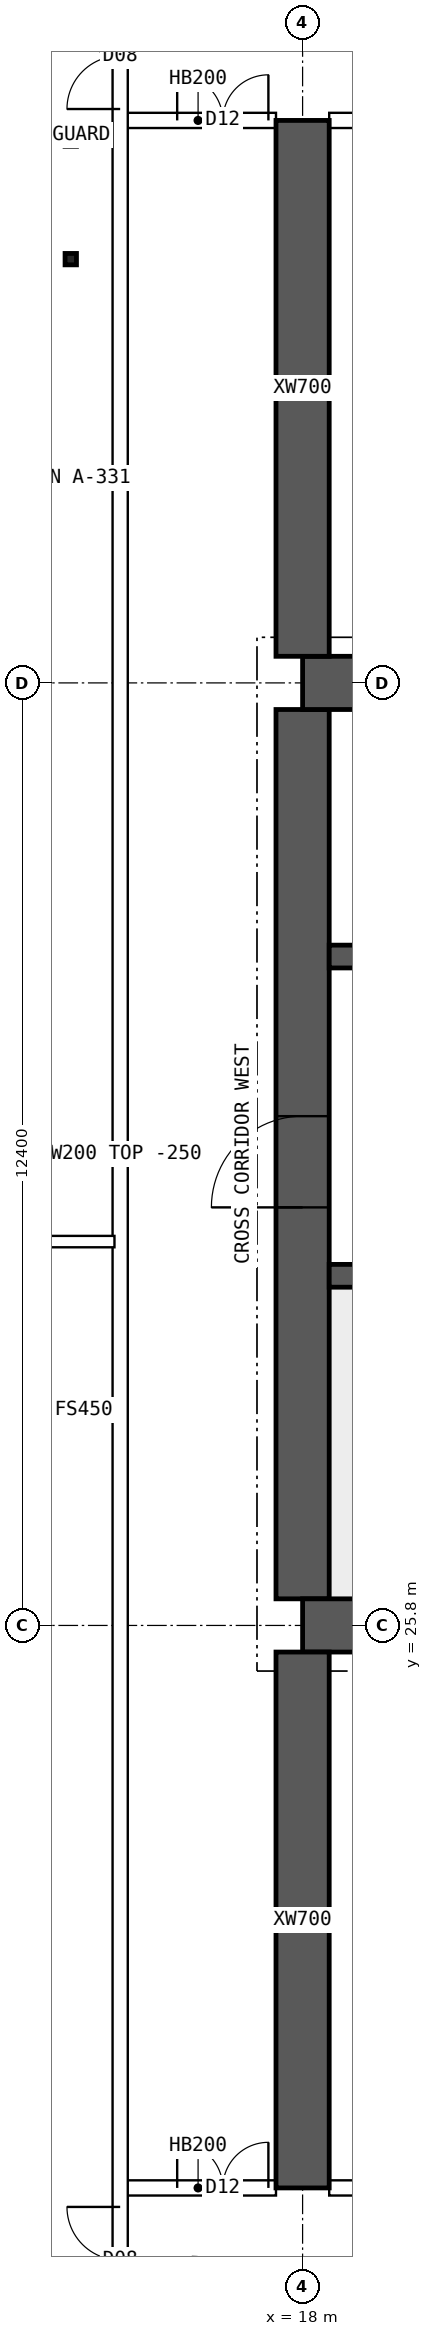
"""IFC4 building model, lengths in metres.
Left out: names, types, materials, properties, quantities, classifications, styles, units other than length and angle.
Written with IfcOpenShell. Run it as: python <this file> out.ifc"""

import sys

from ifc_helpers import new_model, si_unit, direction, frame, frame_2d, origin, origin_2d, place, context, subcontext, project, spatial, polyline, rectangle, hollow_rectangle, outline, extrude, element, fill, save


model = new_model("IFC4")
c1 = context("Model", 3, precision=1e-05, world=origin(), true_north=direction((0.0, 1.0)))
c2 = subcontext(c1, "Body", "Model", "MODEL_VIEW")
j1 = project(units=[si_unit("LENGTHUNIT", "METRE"), si_unit("PLANEANGLEUNIT", "RADIAN")], contexts=[c1])
p1 = place(None, origin())
s1 = spatial("IfcSite", under=j1, at=p1, CompositionType="ELEMENT")
p2 = place(p1, origin())
s2 = spatial("IfcBuilding", under=s1, at=p2, CompositionType="ELEMENT")
p3 = place(p2, frame((0.0, 0.0, 246.55)))
s3 = spatial("IfcBuildingStorey", under=s2, at=p3, CompositionType="ELEMENT", Elevation=246.55)
for number, where, z_axis, x_axis in (
    (1, (18.0, 25.8, 0.0), (0.0, 0.0, 1.0), (1.0, 0.0, 0.0)),
    (2, (18.0, 38.2, 0.0), (0.0, 0.0, 1.0), (1.0, 0.0, 0.0)),
):
    element("IfcWall", number, at=place(p3, frame(where, z_axis=z_axis, x_axis=x_axis)), inside=s3, PredefinedType="SHEAR", context=c2, shape_type="SweptSolid", body=[
        extrude(rectangle(XDim=48.0, YDim=0.7, at=frame_2d((24.0, 0.0))), origin(), (0.0, 0.0, 1.0), 3.75),
    ])
p4 = place(p3, frame((18.0, 26.15, 0.0), z_axis=(0.0, 0.0, 1.0), x_axis=(0.0, 1.0, 0.0)))
e3 = element("IfcWall", 3, at=p4, inside=s3, PredefinedType="SHEAR", context=c2, shape_type="SweptSolid", body=[
    extrude(rectangle(XDim=11.7, YDim=0.7, at=frame_2d((5.85, 0.0))), origin(), (0.0, 0.0, 1.0), 3.75),
])
p5 = place(p4, frame((5.15, 0.0, 0.0)))
e4 = element("IfcOpeningElement", 4, at=p5, cuts=e3, PredefinedType="OPENING", context=c2, shape_type="SweptSolid", body=[
    extrude(rectangle(XDim=1.2, YDim=2.1, at=frame_2d((0.6, 1.05))), frame((0.0, 0.36, 0.0), z_axis=(0.0, -1.0, 0.0), x_axis=(1.0, 0.0, 0.0)), (0.0, 0.0, 1.0), 0.72),
])
p6 = place(p3, frame((18.35, 30.4, 0.0), z_axis=(0.0, 0.0, 1.0), x_axis=(1.0, 0.0, 0.0)))
e5 = element("IfcWall", 5, at=p6, inside=s3, PredefinedType="SHEAR", context=c2, shape_type="SweptSolid", body=[
    extrude(rectangle(XDim=47.3, YDim=0.3, at=frame_2d((23.65, 0.0))), origin(), (0.0, 0.0, 1.0), 3.75),
])
p7 = place(p6, frame((0.4, 0.0, 0.0)))
e6 = element("IfcOpeningElement", 6, at=p7, cuts=e5, PredefinedType="OPENING", context=c2, shape_type="SweptSolid", body=[
    extrude(rectangle(XDim=1.0, YDim=2.1, at=frame_2d((0.5, 1.05))), frame((0.0, 0.16, 0.0), z_axis=(0.0, -1.0, 0.0), x_axis=(1.0, 0.0, 0.0)), (0.0, 0.0, 1.0), 0.32),
])
p8 = place(p6, frame((45.9, 0.0, 0.0)))
e7 = element("IfcOpeningElement", 7, at=p8, cuts=e5, PredefinedType="OPENING", context=c2, shape_type="SweptSolid", body=[
    extrude(rectangle(XDim=1.0, YDim=2.1, at=frame_2d((0.5, 1.05))), frame((0.0, 0.16, 0.0), z_axis=(0.0, -1.0, 0.0), x_axis=(1.0, 0.0, 0.0)), (0.0, 0.0, 1.0), 0.32),
])
p9 = place(p6, frame((8.4, 0.0, 0.0)))
e8 = element("IfcOpeningElement", 8, at=p9, cuts=e5, PredefinedType="OPENING", context=c2, shape_type="SweptSolid", body=[
    extrude(rectangle(XDim=1.1, YDim=2.1, at=frame_2d((0.55, 1.05))), frame((0.0, 0.16, 0.0), z_axis=(0.0, -1.0, 0.0), x_axis=(1.0, 0.0, 0.0)), (0.0, 0.0, 1.0), 0.32),
])
p10 = place(p6, frame((11.0, 0.0, 0.0)))
e9 = element("IfcOpeningElement", 9, at=p10, cuts=e5, PredefinedType="OPENING", context=c2, shape_type="SweptSolid", body=[
    extrude(rectangle(XDim=1.1, YDim=2.1, at=frame_2d((0.55, 1.05))), frame((0.0, 0.16, 0.0), z_axis=(0.0, -1.0, 0.0), x_axis=(1.0, 0.0, 0.0)), (0.0, 0.0, 1.0), 0.32),
])
p11 = place(p6, frame((13.6, 0.0, 0.0)))
e10 = element("IfcOpeningElement", 10, at=p11, cuts=e5, PredefinedType="OPENING", context=c2, shape_type="SweptSolid", body=[
    extrude(rectangle(XDim=1.1, YDim=2.1, at=frame_2d((0.55, 1.05))), frame((0.0, 0.16, 0.0), z_axis=(0.0, -1.0, 0.0), x_axis=(1.0, 0.0, 0.0)), (0.0, 0.0, 1.0), 0.32),
])
p12 = place(p6, frame((16.2, 0.0, 0.0)))
e11 = element("IfcOpeningElement", 11, at=p12, cuts=e5, PredefinedType="OPENING", context=c2, shape_type="SweptSolid", body=[
    extrude(rectangle(XDim=1.1, YDim=2.1, at=frame_2d((0.55, 1.05))), frame((0.0, 0.16, 0.0), z_axis=(0.0, -1.0, 0.0), x_axis=(1.0, 0.0, 0.0)), (0.0, 0.0, 1.0), 0.32),
])
p13 = place(p6, frame((18.975, 0.0, 0.0)))
e12 = element("IfcOpeningElement", 12, at=p13, cuts=e5, PredefinedType="OPENING", context=c2, shape_type="SweptSolid", body=[
    extrude(rectangle(XDim=0.9, YDim=2.1, at=frame_2d((0.45, 1.05))), frame((0.0, 0.16, 0.0), z_axis=(0.0, -1.0, 0.0), x_axis=(1.0, 0.0, 0.0)), (0.0, 0.0, 1.0), 0.32),
])
p14 = place(p6, frame((24.475, 0.0, 0.0)))
e13 = element("IfcOpeningElement", 13, at=p14, cuts=e5, PredefinedType="OPENING", context=c2, shape_type="SweptSolid", body=[
    extrude(rectangle(XDim=0.9, YDim=2.1, at=frame_2d((0.45, 1.05))), frame((0.0, 0.16, 0.0), z_axis=(0.0, -1.0, 0.0), x_axis=(1.0, 0.0, 0.0)), (0.0, 0.0, 1.0), 0.32),
])
p15 = place(p6, frame((30.267, 0.0, 0.0)))
e14 = element("IfcOpeningElement", 14, at=p15, cuts=e5, PredefinedType="OPENING", context=c2, shape_type="SweptSolid", body=[
    extrude(rectangle(XDim=1.1, YDim=2.1, at=frame_2d((0.55, 1.05))), frame((0.0, 0.16, 0.0), z_axis=(0.0, -1.0, 0.0), x_axis=(1.0, 0.0, 0.0)), (0.0, 0.0, 1.0), 0.32),
])
p16 = place(p6, frame((33.8, 0.0, 0.0)))
e15 = element("IfcOpeningElement", 15, at=p16, cuts=e5, PredefinedType="OPENING", context=c2, shape_type="SweptSolid", body=[
    extrude(rectangle(XDim=1.1, YDim=2.1, at=frame_2d((0.55, 1.05))), frame((0.0, 0.16, 0.0), z_axis=(0.0, -1.0, 0.0), x_axis=(1.0, 0.0, 0.0)), (0.0, 0.0, 1.0), 0.32),
])
p17 = place(p6, frame((37.333, 0.0, 0.0)))
e16 = element("IfcOpeningElement", 16, at=p17, cuts=e5, PredefinedType="OPENING", context=c2, shape_type="SweptSolid", body=[
    extrude(rectangle(XDim=1.1, YDim=2.1, at=frame_2d((0.55, 1.05))), frame((0.0, 0.16, 0.0), z_axis=(0.0, -1.0, 0.0), x_axis=(1.0, 0.0, 0.0)), (0.0, 0.0, 1.0), 0.32),
])
p18 = place(p3, frame((18.35, 34.6, 0.0), z_axis=(0.0, 0.0, 1.0), x_axis=(1.0, 0.0, 0.0)))
e17 = element("IfcWall", 17, at=p18, inside=s3, PredefinedType="SHEAR", context=c2, shape_type="SweptSolid", body=[
    extrude(rectangle(XDim=47.3, YDim=0.3, at=frame_2d((23.65, 0.0))), origin(), (0.0, 0.0, 1.0), 3.75),
])
p19 = place(p18, frame((0.9, 0.0, 0.0)))
e18 = element("IfcOpeningElement", 18, at=p19, cuts=e17, PredefinedType="OPENING", context=c2, shape_type="SweptSolid", body=[
    extrude(rectangle(XDim=1.1, YDim=2.1, at=frame_2d((0.55, 1.05))), frame((0.0, 0.16, 0.0), z_axis=(0.0, -1.0, 0.0), x_axis=(1.0, 0.0, 0.0)), (0.0, 0.0, 1.0), 0.32),
])
p20 = place(p18, frame((45.3, 0.0, 0.0)))
e19 = element("IfcOpeningElement", 19, at=p20, cuts=e17, PredefinedType="OPENING", context=c2, shape_type="SweptSolid", body=[
    extrude(rectangle(XDim=1.1, YDim=2.1, at=frame_2d((0.55, 1.05))), frame((0.0, 0.16, 0.0), z_axis=(0.0, -1.0, 0.0), x_axis=(1.0, 0.0, 0.0)), (0.0, 0.0, 1.0), 0.32),
])
p21 = place(p18, frame((4.25, 0.0, 0.0)))
e20 = element("IfcOpeningElement", 20, at=p21, cuts=e17, PredefinedType="OPENING", context=c2, shape_type="SweptSolid", body=[
    extrude(rectangle(XDim=0.9, YDim=2.1, at=frame_2d((0.45, 1.05))), frame((0.0, 0.16, 0.0), z_axis=(0.0, -1.0, 0.0), x_axis=(1.0, 0.0, 0.0)), (0.0, 0.0, 1.0), 0.32),
])
p22 = place(p18, frame((42.15, 0.0, 0.0)))
e21 = element("IfcOpeningElement", 21, at=p22, cuts=e17, PredefinedType="OPENING", context=c2, shape_type="SweptSolid", body=[
    extrude(rectangle(XDim=0.9, YDim=2.1, at=frame_2d((0.45, 1.05))), frame((0.0, 0.16, 0.0), z_axis=(0.0, -1.0, 0.0), x_axis=(1.0, 0.0, 0.0)), (0.0, 0.0, 1.0), 0.32),
])
p23 = place(p18, frame((9.025, 0.0, 0.0)))
e22 = element("IfcOpeningElement", 22, at=p23, cuts=e17, PredefinedType="OPENING", context=c2, shape_type="SweptSolid", body=[
    extrude(rectangle(XDim=0.9, YDim=2.1, at=frame_2d((0.45, 1.05))), frame((0.0, 0.16, 0.0), z_axis=(0.0, -1.0, 0.0), x_axis=(1.0, 0.0, 0.0)), (0.0, 0.0, 1.0), 0.32),
])
p24 = place(p18, frame((12.999, 0.0, 0.0)))
e23 = element("IfcOpeningElement", 23, at=p24, cuts=e17, PredefinedType="OPENING", context=c2, shape_type="SweptSolid", body=[
    extrude(rectangle(XDim=0.9, YDim=2.1, at=frame_2d((0.45, 1.05))), frame((0.0, 0.16, 0.0), z_axis=(0.0, -1.0, 0.0), x_axis=(1.0, 0.0, 0.0)), (0.0, 0.0, 1.0), 0.32),
])
p25 = place(p18, frame((16.646, 0.0, 0.0)))
e24 = element("IfcOpeningElement", 24, at=p25, cuts=e17, PredefinedType="OPENING", context=c2, shape_type="SweptSolid", body=[
    extrude(rectangle(XDim=0.9, YDim=2.1, at=frame_2d((0.45, 1.05))), frame((0.0, 0.16, 0.0), z_axis=(0.0, -1.0, 0.0), x_axis=(1.0, 0.0, 0.0)), (0.0, 0.0, 1.0), 0.32),
])
p26 = place(p18, frame((20.405, 0.0, 0.0)))
e25 = element("IfcOpeningElement", 25, at=p26, cuts=e17, PredefinedType="OPENING", context=c2, shape_type="SweptSolid", body=[
    extrude(rectangle(XDim=0.9, YDim=2.1, at=frame_2d((0.45, 1.05))), frame((0.0, 0.16, 0.0), z_axis=(0.0, -1.0, 0.0), x_axis=(1.0, 0.0, 0.0)), (0.0, 0.0, 1.0), 0.32),
])
p27 = place(p18, frame((24.811, 0.0, 0.0)))
e26 = element("IfcOpeningElement", 26, at=p27, cuts=e17, PredefinedType="OPENING", context=c2, shape_type="SweptSolid", body=[
    extrude(rectangle(XDim=0.9, YDim=2.1, at=frame_2d((0.45, 1.05))), frame((0.0, 0.16, 0.0), z_axis=(0.0, -1.0, 0.0), x_axis=(1.0, 0.0, 0.0)), (0.0, 0.0, 1.0), 0.32),
])
p28 = place(p18, frame((27.608, 0.0, 0.0)))
e27 = element("IfcOpeningElement", 27, at=p28, cuts=e17, PredefinedType="OPENING", context=c2, shape_type="SweptSolid", body=[
    extrude(rectangle(XDim=0.9, YDim=2.1, at=frame_2d((0.45, 1.05))), frame((0.0, 0.16, 0.0), z_axis=(0.0, -1.0, 0.0), x_axis=(1.0, 0.0, 0.0)), (0.0, 0.0, 1.0), 0.32),
])
p29 = place(p18, frame((29.778, 0.0, 0.0)))
e28 = element("IfcOpeningElement", 28, at=p29, cuts=e17, PredefinedType="OPENING", context=c2, shape_type="SweptSolid", body=[
    extrude(rectangle(XDim=0.9, YDim=2.1, at=frame_2d((0.45, 1.05))), frame((0.0, 0.16, 0.0), z_axis=(0.0, -1.0, 0.0), x_axis=(1.0, 0.0, 0.0)), (0.0, 0.0, 1.0), 0.32),
])
p30 = place(p18, frame((33.577, 0.0, 0.0)))
e29 = element("IfcOpeningElement", 29, at=p30, cuts=e17, PredefinedType="OPENING", context=c2, shape_type="SweptSolid", body=[
    extrude(rectangle(XDim=0.9, YDim=2.1, at=frame_2d((0.45, 1.05))), frame((0.0, 0.16, 0.0), z_axis=(0.0, -1.0, 0.0), x_axis=(1.0, 0.0, 0.0)), (0.0, 0.0, 1.0), 0.32),
])
p31 = place(p18, frame((37.528, 0.0, 0.0)))
e30 = element("IfcOpeningElement", 30, at=p31, cuts=e17, PredefinedType="OPENING", context=c2, shape_type="SweptSolid", body=[
    extrude(rectangle(XDim=0.9, YDim=2.1, at=frame_2d((0.45, 1.05))), frame((0.0, 0.16, 0.0), z_axis=(0.0, -1.0, 0.0), x_axis=(1.0, 0.0, 0.0)), (0.0, 0.0, 1.0), 0.32),
])
for number, where, z_axis, x_axis in (
    (31, (18.0, 18.4, 0.0), (0.0, 0.0, 1.0), (0.0, 1.0, 0.0)),
    (32, (18.0, 38.55, 0.0), (0.0, 0.0, 1.0), (0.0, 1.0, 0.0)),
):
    element("IfcWall", number, at=place(p3, frame(where, z_axis=z_axis, x_axis=x_axis)), inside=s3, PredefinedType="SHEAR", context=c2, shape_type="SweptSolid", body=[
        extrude(rectangle(XDim=7.05, YDim=0.7, at=frame_2d((3.525, 0.0))), origin(), (0.0, 0.0, 1.0), 3.75),
    ])
p32 = place(p3, frame((15.6, 18.4, 0.0), z_axis=(0.0, 0.0, 1.0), x_axis=(1.0, 0.0, 0.0)))
e33 = element("IfcWall", 33, at=p32, inside=s3, PredefinedType="SOLIDWALL", context=c2, shape_type="SweptSolid", body=[
    extrude(rectangle(XDim=2.05, YDim=0.2, at=frame_2d((1.025, 0.0))), origin(), (0.0, 0.0, 1.0), 3.5),
])
p33 = place(p32, frame((0.75, 0.0, 0.0)))
e34 = element("IfcOpeningElement", 34, at=p33, cuts=e33, PredefinedType="OPENING", context=c2, shape_type="SweptSolid", body=[
    extrude(rectangle(XDim=1.2, YDim=2.1, at=frame_2d((0.6, 1.05))), frame((0.0, 0.11, 0.0), z_axis=(0.0, -1.0, 0.0), x_axis=(1.0, 0.0, 0.0)), (0.0, 0.0, 1.0), 0.22),
])
p34 = place(p3, frame((18.35, 18.4, 0.0), z_axis=(0.0, 0.0, 1.0), x_axis=(1.0, 0.0, 0.0)))
e35 = element("IfcWall", 35, at=p34, inside=s3, PredefinedType="SOLIDWALL", context=c2, shape_type="SweptSolid", body=[
    extrude(rectangle(XDim=5.3, YDim=0.2, at=frame_2d((2.65, 0.0))), origin(), (0.0, 0.0, 1.0), 3.5),
])
p35 = place(p34, frame((0.35, 0.0, 0.0)))
e36 = element("IfcOpeningElement", 36, at=p35, cuts=e35, PredefinedType="OPENING", context=c2, shape_type="SweptSolid", body=[
    extrude(rectangle(XDim=0.9, YDim=2.1, at=frame_2d((0.45, 1.05))), frame((0.0, 0.11, 0.0), z_axis=(0.0, -1.0, 0.0), x_axis=(1.0, 0.0, 0.0)), (0.0, 0.0, 1.0), 0.22),
])
p36 = place(p34, frame((3.185, 0.0, 0.0)))
e37 = element("IfcOpeningElement", 37, at=p36, cuts=e35, PredefinedType="OPENING", context=c2, shape_type="SweptSolid", body=[
    extrude(rectangle(XDim=0.9, YDim=2.1, at=frame_2d((0.45, 1.05))), frame((0.0, 0.11, 0.0), z_axis=(0.0, -1.0, 0.0), x_axis=(1.0, 0.0, 0.0)), (0.0, 0.0, 1.0), 0.22),
])
p37 = place(p3, frame((15.6, 45.6, 0.0), z_axis=(0.0, 0.0, 1.0), x_axis=(1.0, 0.0, 0.0)))
e38 = element("IfcWall", 38, at=p37, inside=s3, PredefinedType="SOLIDWALL", context=c2, shape_type="SweptSolid", body=[
    extrude(rectangle(XDim=2.05, YDim=0.2, at=frame_2d((1.025, 0.0))), origin(), (0.0, 0.0, 1.0), 3.5),
])
p38 = place(p37, frame((0.75, 0.0, 0.0)))
e39 = element("IfcOpeningElement", 39, at=p38, cuts=e38, PredefinedType="OPENING", context=c2, shape_type="SweptSolid", body=[
    extrude(rectangle(XDim=1.2, YDim=2.1, at=frame_2d((0.6, 1.05))), frame((0.0, 0.11, 0.0), z_axis=(0.0, -1.0, 0.0), x_axis=(1.0, 0.0, 0.0)), (0.0, 0.0, 1.0), 0.22),
])
p39 = place(p3, frame((18.35, 45.6, 0.0), z_axis=(0.0, 0.0, 1.0), x_axis=(1.0, 0.0, 0.0)))
e40 = element("IfcWall", 40, at=p39, inside=s3, PredefinedType="SOLIDWALL", context=c2, shape_type="SweptSolid", body=[
    extrude(rectangle(XDim=5.3, YDim=0.2, at=frame_2d((2.65, 0.0))), origin(), (0.0, 0.0, 1.0), 3.5),
])
p40 = place(p39, frame((0.35, 0.0, 0.0)))
e41 = element("IfcOpeningElement", 41, at=p40, cuts=e40, PredefinedType="OPENING", context=c2, shape_type="SweptSolid", body=[
    extrude(rectangle(XDim=0.9, YDim=2.1, at=frame_2d((0.45, 1.05))), frame((0.0, 0.11, 0.0), z_axis=(0.0, -1.0, 0.0), x_axis=(1.0, 0.0, 0.0)), (0.0, 0.0, 1.0), 0.22),
])
p41 = place(p39, frame((2.775, 0.0, 0.0)))
e42 = element("IfcOpeningElement", 42, at=p41, cuts=e40, PredefinedType="OPENING", context=c2, shape_type="SweptSolid", body=[
    extrude(rectangle(XDim=0.9, YDim=2.1, at=frame_2d((0.45, 1.05))), frame((0.0, 0.11, 0.0), z_axis=(0.0, -1.0, 0.0), x_axis=(1.0, 0.0, 0.0)), (0.0, 0.0, 1.0), 0.22),
])
p42 = place(p3, frame((8.705, 30.85, 0.0), z_axis=(0.0, 0.0, 1.0), x_axis=(1.0, 0.0, 0.0)))
e43 = element("IfcWall", 43, at=p42, inside=s3, PredefinedType="PARTITIONING", context=c2, shape_type="SweptSolid", body=[
    extrude(outline(polyline([(0.0, 0.0), (6.82, 0.0), (6.82, 3.5), (3.597, 3.5), (3.595, 3.05), (2.997, 3.05), (2.995, 3.5), (0.0, 3.5), (0.0, 0.0)])), frame((0.0, 0.075, 0.0), z_axis=(0.0, -1.0, 0.0), x_axis=(1.0, 0.0, 0.0)), (0.0, 0.0, 1.0), 0.15),
])
p43 = place(p3, frame((15.6, 11.646, 0.0), z_axis=(0.0, 0.0, 1.0), x_axis=(0.0, 1.0, 0.0)))
e44 = element("IfcWall", 44, at=p43, inside=s3, PredefinedType="SOLIDWALL", context=c2, shape_type="SweptSolid", body=[
    extrude(rectangle(XDim=40.708, YDim=0.2, at=frame_2d((20.354, 0.0))), origin(), (0.0, 0.0, 1.0), 3.5),
])
p44 = place(p43, frame((5.104, 0.0, 0.0)))
e45 = element("IfcOpeningElement", 45, at=p44, cuts=e44, PredefinedType="OPENING", context=c2, shape_type="SweptSolid", body=[
    extrude(rectangle(XDim=1.4, YDim=2.1, at=frame_2d((0.7, 1.05))), frame((0.0, 0.11, 0.0), z_axis=(0.0, -1.0, 0.0), x_axis=(1.0, 0.0, 0.0)), (0.0, 0.0, 1.0), 0.22),
])
p45 = place(p43, frame((34.104, 0.0, 0.0)))
e46 = element("IfcOpeningElement", 46, at=p45, cuts=e44, PredefinedType="OPENING", context=c2, shape_type="SweptSolid", body=[
    extrude(rectangle(XDim=1.4, YDim=2.1, at=frame_2d((0.7, 1.05))), frame((0.0, 0.11, 0.0), z_axis=(0.0, -1.0, 0.0), x_axis=(1.0, 0.0, 0.0)), (0.0, 0.0, 1.0), 0.22),
])
for number, where, z_axis, x_axis in (
    (47, (14.95, 43.775, 0.0), (0.0, 0.0, 1.0), (1.0, 0.0, 0.0)),
    (48, (14.95, 45.335, 0.0), (0.0, 0.0, 1.0), (1.0, 0.0, 0.0)),
):
    element("IfcColumn", number, at=place(p3, frame(where, z_axis=z_axis, x_axis=x_axis)), inside=s3, PredefinedType="COLUMN", context=c2, shape_type="SweptSolid", body=[
        extrude(hollow_rectangle(XDim=0.15, YDim=0.15, WallThickness=0.008, at=origin_2d()), origin(), (0.0, 0.0, 1.0), 3.5),
    ])
p46 = place(p5, origin())
e49 = element("IfcDoor", 49, at=p46, inside=s3, OperationType="SINGLE_SWING_LEFT", PredefinedType="DOOR", context=c2, shape_type="SweptSolid", body=[
    extrude(rectangle(XDim=1.2, YDim=2.1, at=frame_2d((0.6, 1.05))), frame((0.0, 0.025, 0.0), z_axis=(0.0, -1.0, 0.0), x_axis=(1.0, 0.0, 0.0)), (0.0, 0.0, 1.0), 0.05),
])
fill(e4, e49)
p47 = place(p33, origin())
e50 = element("IfcDoor", 50, at=p47, inside=s3, OperationType="DOUBLE_DOOR_SINGLE_SWING", PredefinedType="DOOR", context=c2, shape_type="SweptSolid", body=[
    extrude(rectangle(XDim=1.2, YDim=2.1, at=frame_2d((0.6, 1.05))), frame((0.0, 0.025, 0.0), z_axis=(0.0, -1.0, 0.0), x_axis=(1.0, 0.0, 0.0)), (0.0, 0.0, 1.0), 0.05),
])
fill(e34, e50)
p48 = place(p38, origin())
e51 = element("IfcDoor", 51, at=p48, inside=s3, OperationType="DOUBLE_DOOR_SINGLE_SWING", PredefinedType="DOOR", context=c2, shape_type="SweptSolid", body=[
    extrude(rectangle(XDim=1.2, YDim=2.1, at=frame_2d((0.6, 1.05))), frame((0.0, 0.025, 0.0), z_axis=(0.0, -1.0, 0.0), x_axis=(1.0, 0.0, 0.0)), (0.0, 0.0, 1.0), 0.05),
])
fill(e39, e51)
p49 = place(p44, origin())
e52 = element("IfcDoor", 52, at=p49, inside=s3, OperationType="DOUBLE_DOOR_SINGLE_SWING", PredefinedType="DOOR", context=c2, shape_type="SweptSolid", body=[
    extrude(rectangle(XDim=1.4, YDim=2.1, at=frame_2d((0.7, 1.05))), frame((0.0, 0.025, 0.0), z_axis=(0.0, -1.0, 0.0), x_axis=(1.0, 0.0, 0.0)), (0.0, 0.0, 1.0), 0.05),
])
fill(e45, e52)
p50 = place(p45, origin())
e53 = element("IfcDoor", 53, at=p50, inside=s3, OperationType="DOUBLE_DOOR_SINGLE_SWING", PredefinedType="DOOR", context=c2, shape_type="SweptSolid", body=[
    extrude(rectangle(XDim=1.4, YDim=2.1, at=frame_2d((0.7, 1.05))), frame((0.0, 0.025, 0.0), z_axis=(0.0, -1.0, 0.0), x_axis=(1.0, 0.0, 0.0)), (0.0, 0.0, 1.0), 0.05),
])
fill(e46, e53)
save(model, sys.argv[1])
